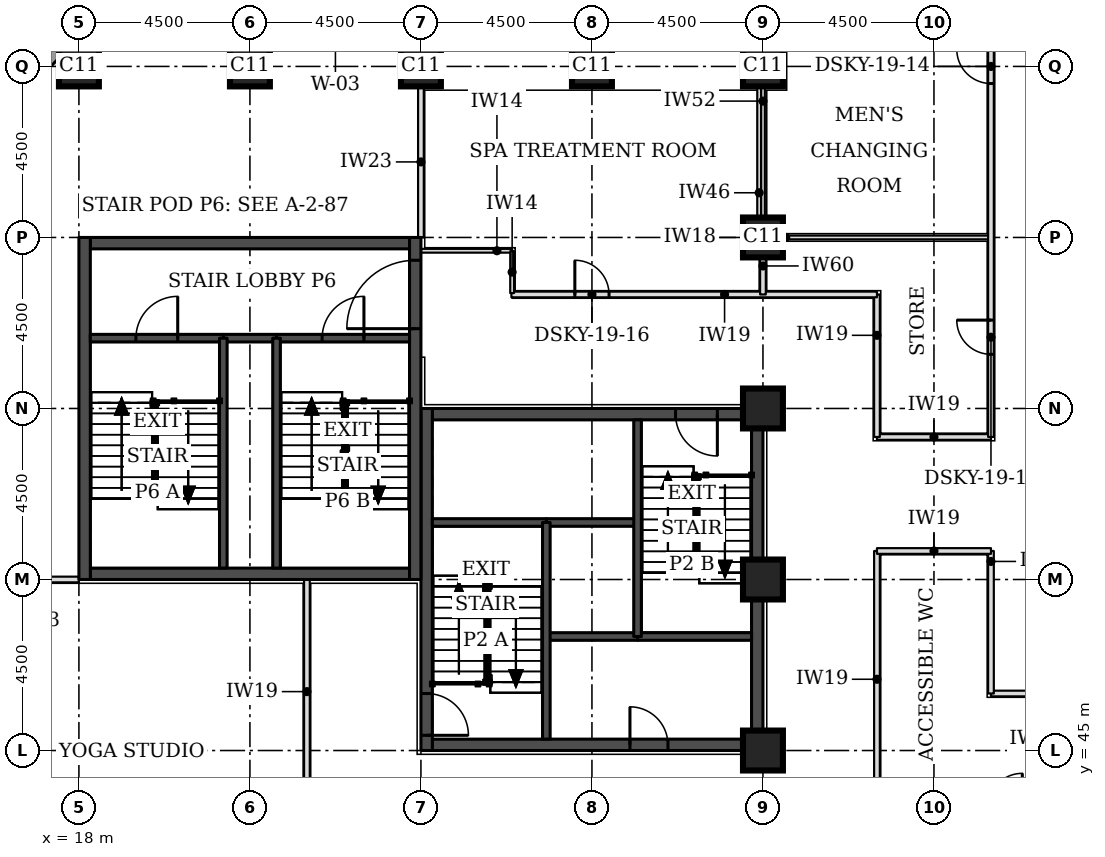
"""IFC4 building model, lengths in metres.
Left out: names, types, materials, properties, quantities, classifications, styles, units other than length and angle.
Written with IfcOpenShell. Run it as: python <this file> out.ifc"""

import sys

from ifc_helpers import new_model, si_unit, direction, frame, frame_2d, origin, origin_2d, place, context, subcontext, project, spatial, rectangle, extrude, element, fill, save


model = new_model("IFC4")
c1 = context("Model", 3, precision=1e-05, world=origin(), true_north=direction((0.0, 1.0)))
c2 = subcontext(c1, "Body", "Model", "MODEL_VIEW")
j1 = project(units=[si_unit("LENGTHUNIT", "METRE"), si_unit("PLANEANGLEUNIT", "RADIAN")], contexts=[c1])
p1 = place(None, origin())
s1 = spatial("IfcSite", under=j1, at=p1, CompositionType="ELEMENT")
p2 = place(p1, origin())
s2 = spatial("IfcBuilding", under=s1, at=p2, CompositionType="ELEMENT")
p3 = place(p2, frame((0.0, 0.0, 74.3)))
s3 = spatial("IfcBuildingStorey", under=s2, at=p3, CompositionType="ELEMENT", Elevation=74.3)
for number, where, z_axis, x_axis in (
    (1, (36.0, 45.0, 0.0), (0.0, 0.0, 1.0), (1.0, 0.0, 0.0)),
    (2, (36.0, 49.5, 0.0), (0.0, 0.0, 1.0), (1.0, 0.0, 0.0)),
    (3, (36.0, 54.0, 0.0), (0.0, 0.0, 1.0), (1.0, 0.0, 0.0)),
    (4, (36.0, 58.5, 0.0), (0.0, 0.0, 1.0), (1.0, 0.0, 0.0)),
    (5, (18.0, 63.0, 0.0), (0.0, 0.0, 1.0), (1.0, 0.0, 0.0)),
    (6, (22.5, 63.0, 0.0), (0.0, 0.0, 1.0), (1.0, 0.0, 0.0)),
    (7, (27.0, 63.0, 0.0), (0.0, 0.0, 1.0), (1.0, 0.0, 0.0)),
    (8, (31.5, 63.0, 0.0), (0.0, 0.0, 1.0), (1.0, 0.0, 0.0)),
    (9, (36.0, 63.0, 0.0), (0.0, 0.0, 1.0), (1.0, 0.0, 0.0)),
):
    element("IfcColumn", number, at=place(p3, frame(where, z_axis=z_axis, x_axis=x_axis)), inside=s3, PredefinedType="COLUMN", context=c2, shape_type="SweptSolid", body=[
        extrude(rectangle(XDim=1.05, YDim=1.05, at=origin_2d()), origin(), (0.0, 0.0, 1.0), 4.6),
    ])
p4 = place(p3, frame((27.3, 45.15, 0.0), z_axis=(0.0, 0.0, 1.0), x_axis=(1.0, 0.0, 0.0)))
e10 = element("IfcWall", 10, at=p4, inside=s3, PredefinedType="SHEAR", context=c2, shape_type="SweptSolid", body=[
    extrude(rectangle(XDim=8.4, YDim=0.3, at=frame_2d((4.2, 0.0))), origin(), (0.0, 0.0, 1.0), 4.6),
])
p5 = place(p4, frame((5.2, 0.0, 0.0)))
e11 = element("IfcOpeningElement", 11, at=p5, cuts=e10, PredefinedType="OPENING", context=c2, shape_type="SweptSolid", body=[
    extrude(rectangle(XDim=1.0, YDim=2.1, at=frame_2d((0.5, 1.05))), frame((0.0, 0.16, 0.0), z_axis=(0.0, -1.0, 0.0), x_axis=(1.0, 0.0, 0.0)), (0.0, 0.0, 1.0), 0.32),
])
p6 = place(p3, frame((27.3, 53.85, 0.0), z_axis=(0.0, 0.0, 1.0), x_axis=(1.0, 0.0, 0.0)))
e12 = element("IfcWall", 12, at=p6, inside=s3, PredefinedType="SHEAR", context=c2, shape_type="SweptSolid", body=[
    extrude(rectangle(XDim=8.4, YDim=0.3, at=frame_2d((4.2, 0.0))), origin(), (0.0, 0.0, 1.0), 4.6),
])
p7 = place(p6, frame((6.4, 0.0, 0.0)))
e13 = element("IfcOpeningElement", 13, at=p7, cuts=e12, PredefinedType="OPENING", context=c2, shape_type="SweptSolid", body=[
    extrude(rectangle(XDim=1.1, YDim=2.1, at=frame_2d((0.55, 1.05))), frame((0.0, 0.16, 0.0), z_axis=(0.0, -1.0, 0.0), x_axis=(1.0, 0.0, 0.0)), (0.0, 0.0, 1.0), 0.32),
])
p8 = place(p3, frame((27.15, 45.0, 0.0), z_axis=(0.0, 0.0, 1.0), x_axis=(0.0, 1.0, 0.0)))
e14 = element("IfcWall", 14, at=p8, inside=s3, PredefinedType="SHEAR", context=c2, shape_type="SweptSolid", body=[
    extrude(rectangle(XDim=9.0, YDim=0.3, at=frame_2d((4.5, 0.0))), origin(), (0.0, 0.0, 1.0), 4.6),
])
p9 = place(p8, frame((0.4, 0.0, 0.0)))
e15 = element("IfcOpeningElement", 15, at=p9, cuts=e14, PredefinedType="OPENING", context=c2, shape_type="SweptSolid", body=[
    extrude(rectangle(XDim=1.1, YDim=2.1, at=frame_2d((0.55, 1.05))), frame((0.0, 0.16, 0.0), z_axis=(0.0, -1.0, 0.0), x_axis=(1.0, 0.0, 0.0)), (0.0, 0.0, 1.0), 0.32),
])
p10 = place(p3, frame((35.85, 45.0, 0.0), z_axis=(0.0, 0.0, 1.0), x_axis=(0.0, 1.0, 0.0)))
e16 = element("IfcWall", 16, at=p10, inside=s3, PredefinedType="SHEAR", context=c2, shape_type="SweptSolid", body=[
    extrude(rectangle(XDim=9.0, YDim=0.3, at=frame_2d((4.5, 0.0))), origin(), (0.0, 0.0, 1.0), 4.6),
])
for number, where, z_axis, x_axis in (
    (17, (18.3, 49.65, 0.0), (0.0, 0.0, 1.0), (1.0, 0.0, 0.0)),
    (18, (18.3, 58.35, 0.0), (0.0, 0.0, 1.0), (1.0, 0.0, 0.0)),
):
    element("IfcWall", number, at=place(p3, frame(where, z_axis=z_axis, x_axis=x_axis)), inside=s3, PredefinedType="SHEAR", context=c2, shape_type="SweptSolid", body=[
        extrude(rectangle(XDim=8.4, YDim=0.3, at=frame_2d((4.2, 0.0))), origin(), (0.0, 0.0, 1.0), 4.6),
    ])
p11 = place(p3, frame((18.15, 49.5, 0.0), z_axis=(0.0, 0.0, 1.0), x_axis=(0.0, 1.0, 0.0)))
e19 = element("IfcWall", 19, at=p11, inside=s3, PredefinedType="SHEAR", context=c2, shape_type="SweptSolid", body=[
    extrude(rectangle(XDim=9.0, YDim=0.3, at=frame_2d((4.5, 0.0))), origin(), (0.0, 0.0, 1.0), 4.6),
])
p12 = place(p3, frame((26.85, 49.5, 0.0), z_axis=(0.0, 0.0, 1.0), x_axis=(0.0, 1.0, 0.0)))
e20 = element("IfcWall", 20, at=p12, inside=s3, PredefinedType="SHEAR", context=c2, shape_type="SweptSolid", body=[
    extrude(rectangle(XDim=9.0, YDim=0.3, at=frame_2d((4.5, 0.0))), origin(), (0.0, 0.0, 1.0), 4.6),
])
p13 = place(p12, frame((6.6, 0.0, 0.0)))
e21 = element("IfcOpeningElement", 21, at=p13, cuts=e20, PredefinedType="OPENING", context=c2, shape_type="SweptSolid", body=[
    extrude(rectangle(XDim=1.8, YDim=2.1, at=frame_2d((0.9, 1.05))), frame((0.0, 0.16, 0.0), z_axis=(0.0, -1.0, 0.0), x_axis=(1.0, 0.0, 0.0)), (0.0, 0.0, 1.0), 0.32),
])
p14 = place(p3, frame((17.761, 63.751, 0.0), z_axis=(0.0, 0.0, 1.0), x_axis=(-0.707106781187, -0.707106781187, 0.0)))
e22 = element("IfcWall", 22, at=p14, inside=s3, PredefinedType="STANDARD", context=c2, shape_type="SweptSolid", body=[
    extrude(rectangle(XDim=7.089, YDim=0.35, at=frame_2d((3.544, 0.0))), origin(), (0.0, 0.0, 1.0), 4.425),
])
p15 = place(p14, frame((1.894, 0.0, 0.9)))
e23 = element("IfcOpeningElement", 23, at=p15, cuts=e22, PredefinedType="OPENING", context=c2, shape_type="SweptSolid", body=[
    extrude(rectangle(XDim=3.3, YDim=2.7, at=frame_2d((1.65, 1.35))), frame((0.0, 0.185, 0.0), z_axis=(0.0, -1.0, 0.0), x_axis=(1.0, 0.0, 0.0)), (0.0, 0.0, 1.0), 0.37),
])
p16 = place(p3, frame((36.0, 58.5, 0.0), z_axis=(0.0, 0.0, 1.0), x_axis=(1.0, 0.0, 0.0)))
e24 = element("IfcWall", 24, at=p16, inside=s3, PredefinedType="PARTITIONING", context=c2, shape_type="SweptSolid", body=[
    extrude(rectangle(XDim=6.0, YDim=0.1, at=frame_2d((3.0, 0.0))), origin(), (0.0, 0.0, 1.0), 4.45),
])
p17 = place(p3, frame((36.0, 58.5, 0.0), z_axis=(0.0, 0.0, 1.0), x_axis=(0.0, 1.0, 0.0)))
e25 = element("IfcWall", 25, at=p17, inside=s3, PredefinedType="PARTITIONING", context=c2, shape_type="SweptSolid", body=[
    extrude(rectangle(XDim=3.975, YDim=0.1, at=frame_2d((1.988, 0.0))), origin(), (0.0, 0.0, 1.0), 3.7),
])
p18 = place(p3, frame((24.0, 42.0, 0.0), z_axis=(0.0, 0.0, 1.0), x_axis=(0.0, 1.0, 0.0)))
e26 = element("IfcWall", 26, at=p18, inside=s3, PredefinedType="PARTITIONING", context=c2, shape_type="SweptSolid", body=[
    extrude(rectangle(XDim=7.5, YDim=0.15, at=frame_2d((3.75, 0.0))), origin(), (0.0, 0.0, 1.0), 4.45),
])
p19 = place(p3, frame((39.0, 43.5, 0.0), z_axis=(0.0, 0.0, 1.0), x_axis=(0.0, 1.0, 0.0)))
e27 = element("IfcWall", 27, at=p19, inside=s3, PredefinedType="PARTITIONING", context=c2, shape_type="SweptSolid", body=[
    extrude(rectangle(XDim=6.75, YDim=0.15, at=frame_2d((3.375, 0.0))), origin(), (0.0, 0.0, 1.0), 4.45),
])
for number, where, z_axis, x_axis in (
    (28, (42.0, 46.5, 0.0), (0.0, 0.0, 1.0), (1.0, 0.0, 0.0)),
    (29, (42.0, 46.5, 0.0), (0.0, 0.0, 1.0), (0.0, 1.0, 0.0)),
):
    element("IfcWall", number, at=place(p3, frame(where, z_axis=z_axis, x_axis=x_axis)), inside=s3, PredefinedType="PARTITIONING", context=c2, shape_type="SweptSolid", body=[
        extrude(rectangle(XDim=3.75, YDim=0.15, at=frame_2d((1.875, 0.0))), origin(), (0.0, 0.0, 1.0), 4.45),
    ])
for number, where, z_axis, x_axis in (
    (30, (39.0, 50.25, 0.0), (0.0, 0.0, 1.0), (1.0, 0.0, 0.0)),
    (31, (39.0, 53.25, 0.0), (0.0, 0.0, 1.0), (1.0, 0.0, 0.0)),
):
    element("IfcWall", number, at=place(p3, frame(where, z_axis=z_axis, x_axis=x_axis)), inside=s3, PredefinedType="PARTITIONING", context=c2, shape_type="SweptSolid", body=[
        extrude(rectangle(XDim=3.0, YDim=0.15, at=frame_2d((1.5, 0.0))), origin(), (0.0, 0.0, 1.0), 4.45),
    ])
p20 = place(p3, frame((39.0, 53.25, 0.0), z_axis=(0.0, 0.0, 1.0), x_axis=(0.0, 1.0, 0.0)))
e32 = element("IfcWall", 32, at=p20, inside=s3, PredefinedType="PARTITIONING", context=c2, shape_type="SweptSolid", body=[
    extrude(rectangle(XDim=3.75, YDim=0.15, at=frame_2d((1.875, 0.0))), origin(), (0.0, 0.0, 1.0), 4.45),
])
p21 = place(p3, frame((42.0, 53.25, 0.0), z_axis=(0.0, 0.0, 1.0), x_axis=(0.0, 1.0, 0.0)))
e33 = element("IfcWall", 33, at=p21, inside=s3, PredefinedType="PARTITIONING", context=c2, shape_type="SweptSolid", body=[
    extrude(rectangle(XDim=21.75, YDim=0.15, at=frame_2d((10.875, 0.0))), origin(), (0.0, 0.0, 1.0), 4.45),
])
p22 = place(p21, frame((2.175, 0.0, 0.0)))
e34 = element("IfcOpeningElement", 34, at=p22, cuts=e33, PredefinedType="OPENING", context=c2, shape_type="SweptSolid", body=[
    extrude(rectangle(XDim=0.9, YDim=2.1, at=frame_2d((0.45, 1.05))), frame((0.0, 0.085, 0.0), z_axis=(0.0, -1.0, 0.0), x_axis=(1.0, 0.0, 0.0)), (0.0, 0.0, 1.0), 0.17),
])
p23 = place(p21, frame((9.3, 0.0, 0.0)))
e35 = element("IfcOpeningElement", 35, at=p23, cuts=e33, PredefinedType="OPENING", context=c2, shape_type="SweptSolid", body=[
    extrude(rectangle(XDim=0.9, YDim=2.1, at=frame_2d((0.45, 1.05))), frame((0.0, 0.085, 0.0), z_axis=(0.0, -1.0, 0.0), x_axis=(1.0, 0.0, 0.0)), (0.0, 0.0, 1.0), 0.17),
])
p24 = place(p21, frame((17.55, 0.0, 0.0)))
e36 = element("IfcOpeningElement", 36, at=p24, cuts=e33, PredefinedType="OPENING", context=c2, shape_type="SweptSolid", body=[
    extrude(rectangle(XDim=0.9, YDim=2.1, at=frame_2d((0.45, 1.05))), frame((0.0, 0.085, 0.0), z_axis=(0.0, -1.0, 0.0), x_axis=(1.0, 0.0, 0.0)), (0.0, 0.0, 1.0), 0.17),
])
p25 = place(p3, frame((29.38, 57.0, 0.0), z_axis=(0.0, 0.0, 1.0), x_axis=(1.0, 0.0, 0.0)))
e37 = element("IfcWall", 37, at=p25, inside=s3, PredefinedType="PARTITIONING", context=c2, shape_type="SweptSolid", body=[
    extrude(rectangle(XDim=9.62, YDim=0.15, at=frame_2d((4.81, 0.0))), origin(), (0.0, 0.0, 1.0), 4.45),
])
p26 = place(p25, frame((1.67, 0.0, 0.0)))
e38 = element("IfcOpeningElement", 38, at=p26, cuts=e37, PredefinedType="OPENING", context=c2, shape_type="SweptSolid", body=[
    extrude(rectangle(XDim=0.9, YDim=2.1, at=frame_2d((0.45, 1.05))), frame((0.0, 0.085, 0.0), z_axis=(0.0, -1.0, 0.0), x_axis=(1.0, 0.0, 0.0)), (0.0, 0.0, 1.0), 0.17),
])
for number, where, z_axis, x_axis in (
    (39, (14.025, 49.5, 0.0), (0.0, 0.0, 1.0), (1.0, 0.0, 0.0)),
    (40, (27.0, 58.5, 0.0), (0.0, 0.0, 1.0), (0.0, 1.0, 0.0)),
):
    element("IfcWall", number, at=place(p3, frame(where, z_axis=z_axis, x_axis=x_axis)), inside=s3, PredefinedType="PARTITIONING", context=c2, shape_type="SweptSolid", body=[
        extrude(rectangle(XDim=3.975, YDim=0.15, at=frame_2d((1.988, 0.0))), origin(), (0.0, 0.0, 1.0), 4.45),
    ])
p27 = place(p3, frame((36.0, 57.0, 0.0), z_axis=(0.0, 0.0, 1.0), x_axis=(0.0, 1.0, 0.0)))
e41 = element("IfcWall", 41, at=p27, inside=s3, PredefinedType="PARTITIONING", context=c2, shape_type="SweptSolid", body=[
    extrude(rectangle(XDim=1.5, YDim=0.15, at=frame_2d((0.75, 0.0))), origin(), (0.0, 0.0, 1.0), 3.7),
])
p28 = place(p3, frame((27.0, 58.15, 0.0), z_axis=(0.0, 0.0, 1.0), x_axis=(1.0, 0.0, 0.0)))
e42 = element("IfcWall", 42, at=p28, inside=s3, PredefinedType="PARTITIONING", context=c2, shape_type="SweptSolid", body=[
    extrude(rectangle(XDim=2.4, YDim=0.1, at=frame_2d((1.2, 0.0))), origin(), (0.0, 0.0, 1.0), 4.45),
])
p29 = place(p3, frame((29.4, 58.14, 0.0), z_axis=(0.0, 0.0, 1.0), x_axis=(0.0, -1.0, 0.0)))
e43 = element("IfcWall", 43, at=p29, inside=s3, PredefinedType="PARTITIONING", context=c2, shape_type="SweptSolid", body=[
    extrude(rectangle(XDim=1.105, YDim=0.1, at=frame_2d((0.552, 0.0))), origin(), (0.0, 0.0, 1.0), 4.45),
])
p30 = place(p3, frame((35.9, 62.475, 0.0), z_axis=(0.0, 0.0, 1.0), x_axis=(0.0, -1.0, 0.0)))
e44 = element("IfcWall", 44, at=p30, inside=s3, PredefinedType="PARTITIONING", context=c2, shape_type="SweptSolid", body=[
    extrude(rectangle(XDim=3.998, YDim=0.1, at=frame_2d((1.999, 0.0))), origin(), (0.0, 0.0, 1.0), 3.7),
])
p31 = place(p3, frame((30.3, 48.0, 0.0), z_axis=(0.0, 0.0, 1.0), x_axis=(1.0, 0.0, 0.0)))
e45 = element("IfcWall", 45, at=p31, inside=s3, PredefinedType="SOLIDWALL", context=c2, shape_type="SweptSolid", body=[
    extrude(rectangle(XDim=2.4, YDim=0.2, at=frame_2d((1.2, 0.0))), origin(), (0.0, 0.0, 1.0), 4.45),
])
p32 = place(p3, frame((32.7, 48.0, 0.0), z_axis=(0.0, 0.0, 1.0), x_axis=(1.0, 0.0, 0.0)))
e46 = element("IfcWall", 46, at=p32, inside=s3, PredefinedType="SOLIDWALL", context=c2, shape_type="SweptSolid", body=[
    extrude(rectangle(XDim=3.0, YDim=0.2, at=frame_2d((1.5, 0.0))), origin(), (0.0, 0.0, 1.0), 4.45),
])
p33 = place(p3, frame((30.3, 51.0, 0.0), z_axis=(0.0, 0.0, 1.0), x_axis=(1.0, 0.0, 0.0)))
e47 = element("IfcWall", 47, at=p33, inside=s3, PredefinedType="SOLIDWALL", context=c2, shape_type="SweptSolid", body=[
    extrude(rectangle(XDim=2.4, YDim=0.2, at=frame_2d((1.2, 0.0))), origin(), (0.0, 0.0, 1.0), 4.6),
])
p34 = place(p3, frame((27.3, 51.0, 0.0), z_axis=(0.0, 0.0, 1.0), x_axis=(1.0, 0.0, 0.0)))
e48 = element("IfcWall", 48, at=p34, inside=s3, PredefinedType="SOLIDWALL", context=c2, shape_type="SweptSolid", body=[
    extrude(rectangle(XDim=3.0, YDim=0.2, at=frame_2d((1.5, 0.0))), origin(), (0.0, 0.0, 1.0), 4.45),
])
for number, where, z_axis, x_axis in (
    (49, (30.3, 45.3, 0.0), (0.0, 0.0, 1.0), (0.0, 1.0, 0.0)),
    (50, (32.7, 48.0, 0.0), (0.0, 0.0, 1.0), (0.0, 1.0, 0.0)),
):
    element("IfcWall", number, at=place(p3, frame(where, z_axis=z_axis, x_axis=x_axis)), inside=s3, PredefinedType="SOLIDWALL", context=c2, shape_type="SweptSolid", body=[
        extrude(rectangle(XDim=5.7, YDim=0.2, at=frame_2d((2.85, 0.0))), origin(), (0.0, 0.0, 1.0), 4.45),
    ])
p35 = place(p3, frame((21.8, 55.85, 0.0), z_axis=(0.0, 0.0, 1.0), x_axis=(1.0, 0.0, 0.0)))
e51 = element("IfcWall", 51, at=p35, inside=s3, PredefinedType="SOLIDWALL", context=c2, shape_type="SweptSolid", body=[
    extrude(rectangle(XDim=1.4, YDim=0.2, at=frame_2d((0.7, 0.0))), origin(), (0.0, 0.0, 1.0), 4.45),
])
p36 = place(p3, frame((18.3, 55.85, 0.0), z_axis=(0.0, 0.0, 1.0), x_axis=(1.0, 0.0, 0.0)))
e52 = element("IfcWall", 52, at=p36, inside=s3, PredefinedType="SOLIDWALL", context=c2, shape_type="SweptSolid", body=[
    extrude(rectangle(XDim=3.5, YDim=0.2, at=frame_2d((1.75, 0.0))), origin(), (0.0, 0.0, 1.0), 4.45),
])
p37 = place(p36, frame((1.2, 0.0, 0.0)))
e53 = element("IfcOpeningElement", 53, at=p37, cuts=e52, PredefinedType="OPENING", context=c2, shape_type="SweptSolid", body=[
    extrude(rectangle(XDim=1.1, YDim=2.1, at=frame_2d((0.55, 1.05))), frame((0.0, 0.11, 0.0), z_axis=(0.0, -1.0, 0.0), x_axis=(1.0, 0.0, 0.0)), (0.0, 0.0, 1.0), 0.22),
])
p38 = place(p3, frame((23.2, 55.85, 0.0), z_axis=(0.0, 0.0, 1.0), x_axis=(1.0, 0.0, 0.0)))
e54 = element("IfcWall", 54, at=p38, inside=s3, PredefinedType="SOLIDWALL", context=c2, shape_type="SweptSolid", body=[
    extrude(rectangle(XDim=3.5, YDim=0.2, at=frame_2d((1.75, 0.0))), origin(), (0.0, 0.0, 1.0), 4.45),
])
p39 = place(p38, frame((1.2, 0.0, 0.0)))
e55 = element("IfcOpeningElement", 55, at=p39, cuts=e54, PredefinedType="OPENING", context=c2, shape_type="SweptSolid", body=[
    extrude(rectangle(XDim=1.1, YDim=2.1, at=frame_2d((0.55, 1.05))), frame((0.0, 0.11, 0.0), z_axis=(0.0, -1.0, 0.0), x_axis=(1.0, 0.0, 0.0)), (0.0, 0.0, 1.0), 0.22),
])
for number, where, z_axis, x_axis in (
    (56, (21.8, 49.8, 0.0), (0.0, 0.0, 1.0), (0.0, 1.0, 0.0)),
    (57, (23.2, 49.8, 0.0), (0.0, 0.0, 1.0), (0.0, 1.0, 0.0)),
):
    element("IfcWall", number, at=place(p3, frame(where, z_axis=z_axis, x_axis=x_axis)), inside=s3, PredefinedType="SOLIDWALL", context=c2, shape_type="SweptSolid", body=[
        extrude(rectangle(XDim=6.05, YDim=0.2, at=frame_2d((3.025, 0.0))), origin(), (0.0, 0.0, 1.0), 4.45),
    ])
p40 = place(p22, origin())
e58 = element("IfcDoor", 58, at=p40, inside=s3, OperationType="SINGLE_SWING_RIGHT", PredefinedType="DOOR", context=c2, shape_type="SweptSolid", body=[
    extrude(rectangle(XDim=0.9, YDim=2.1, at=frame_2d((0.45, 1.05))), frame((0.0, 0.025, 0.0), z_axis=(0.0, -1.0, 0.0), x_axis=(1.0, 0.0, 0.0)), (0.0, 0.0, 1.0), 0.05),
])
fill(e34, e58)
p41 = place(p26, origin())
e59 = element("IfcDoor", 59, at=p41, inside=s3, OperationType="SINGLE_SWING_LEFT", PredefinedType="DOOR", context=c2, shape_type="SweptSolid", body=[
    extrude(rectangle(XDim=0.9, YDim=2.1, at=frame_2d((0.45, 1.05))), frame((0.0, 0.025, 0.0), z_axis=(0.0, -1.0, 0.0), x_axis=(1.0, 0.0, 0.0)), (0.0, 0.0, 1.0), 0.05),
])
fill(e38, e59)
p42 = place(p23, origin())
e60 = element("IfcDoor", 60, at=p42, inside=s3, OperationType="SINGLE_SWING_RIGHT", PredefinedType="DOOR", context=c2, shape_type="SweptSolid", body=[
    extrude(rectangle(XDim=0.9, YDim=2.1, at=frame_2d((0.45, 1.05))), frame((0.0, 0.025, 0.0), z_axis=(0.0, -1.0, 0.0), x_axis=(1.0, 0.0, 0.0)), (0.0, 0.0, 1.0), 0.05),
])
fill(e35, e60)
p43 = place(p9, frame((1.1, 0.0, 0.0), z_axis=(0.0, 0.0, 1.0), x_axis=(-1.0, 0.0, 0.0)))
e61 = element("IfcDoor", 61, at=p43, inside=s3, OperationType="SINGLE_SWING_RIGHT", PredefinedType="DOOR", context=c2, shape_type="SweptSolid", body=[
    extrude(rectangle(XDim=1.1, YDim=2.1, at=frame_2d((0.55, 1.05))), frame((0.0, 0.025, 0.0), z_axis=(0.0, -1.0, 0.0), x_axis=(1.0, 0.0, 0.0)), (0.0, 0.0, 1.0), 0.05),
])
fill(e15, e61)
p44 = place(p7, frame((1.1, 0.0, 0.0), z_axis=(0.0, 0.0, 1.0), x_axis=(-1.0, 0.0, 0.0)))
e62 = element("IfcDoor", 62, at=p44, inside=s3, OperationType="SINGLE_SWING_LEFT", PredefinedType="DOOR", context=c2, shape_type="SweptSolid", body=[
    extrude(rectangle(XDim=1.1, YDim=2.1, at=frame_2d((0.55, 1.05))), frame((0.0, 0.025, 0.0), z_axis=(0.0, -1.0, 0.0), x_axis=(1.0, 0.0, 0.0)), (0.0, 0.0, 1.0), 0.05),
])
fill(e13, e62)
p45 = place(p5, origin())
e63 = element("IfcDoor", 63, at=p45, inside=s3, OperationType="SINGLE_SWING_LEFT", PredefinedType="DOOR", context=c2, shape_type="SweptSolid", body=[
    extrude(rectangle(XDim=1.0, YDim=2.1, at=frame_2d((0.5, 1.05))), frame((0.0, 0.025, 0.0), z_axis=(0.0, -1.0, 0.0), x_axis=(1.0, 0.0, 0.0)), (0.0, 0.0, 1.0), 0.05),
])
fill(e11, e63)
p46 = place(p37, origin())
e64 = element("IfcDoor", 64, at=p46, inside=s3, OperationType="SINGLE_SWING_RIGHT", PredefinedType="DOOR", context=c2, shape_type="SweptSolid", body=[
    extrude(rectangle(XDim=1.1, YDim=2.1, at=frame_2d((0.55, 1.05))), frame((0.0, 0.025, 0.0), z_axis=(0.0, -1.0, 0.0), x_axis=(1.0, 0.0, 0.0)), (0.0, 0.0, 1.0), 0.05),
])
fill(e53, e64)
p47 = place(p39, origin())
e65 = element("IfcDoor", 65, at=p47, inside=s3, OperationType="SINGLE_SWING_RIGHT", PredefinedType="DOOR", context=c2, shape_type="SweptSolid", body=[
    extrude(rectangle(XDim=1.1, YDim=2.1, at=frame_2d((0.55, 1.05))), frame((0.0, 0.025, 0.0), z_axis=(0.0, -1.0, 0.0), x_axis=(1.0, 0.0, 0.0)), (0.0, 0.0, 1.0), 0.05),
])
fill(e55, e65)
p48 = place(p13, origin())
e66 = element("IfcDoor", 66, at=p48, inside=s3, OperationType="SINGLE_SWING_LEFT", PredefinedType="DOOR", context=c2, shape_type="SweptSolid", body=[
    extrude(rectangle(XDim=1.8, YDim=2.1, at=frame_2d((0.9, 1.05))), frame((0.0, 0.025, 0.0), z_axis=(0.0, -1.0, 0.0), x_axis=(1.0, 0.0, 0.0)), (0.0, 0.0, 1.0), 0.05),
])
fill(e21, e66)
save(model, sys.argv[1])
